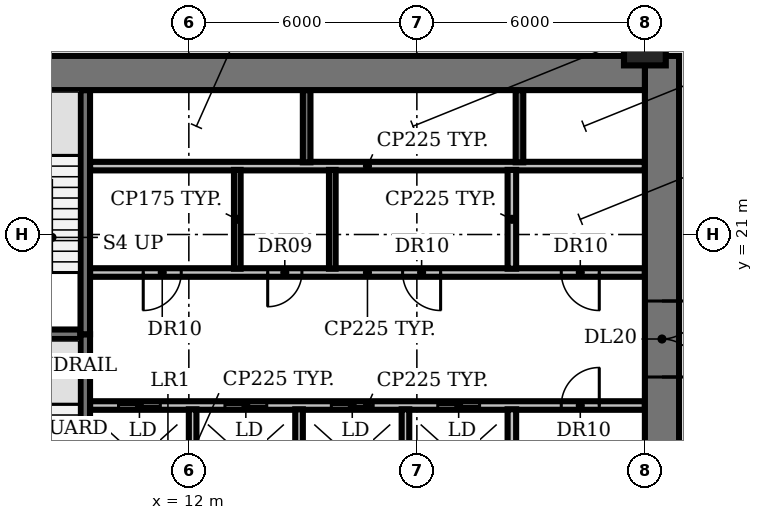
"""IFC4 building model, lengths in metres.
Left out: names, types, materials, properties, quantities, classifications, styles, units other than length and angle.
Written with IfcOpenShell. Run it as: python <this file> out.ifc"""

import sys

from ifc_helpers import new_model, si_unit, direction, frame, frame_2d, origin, origin_2d, place, context, subcontext, project, spatial, rectangle, circle, extrude, element, fill, save


model = new_model("IFC4")
c1 = context("Model", 3, precision=1e-05, world=origin(), true_north=direction((0.0, 1.0)))
c2 = subcontext(c1, "Body", "Model", "MODEL_VIEW")
j1 = project(units=[si_unit("LENGTHUNIT", "METRE"), si_unit("PLANEANGLEUNIT", "RADIAN")], contexts=[c1])
p1 = place(None, origin())
s1 = spatial("IfcSite", under=j1, at=p1, CompositionType="ELEMENT")
p2 = place(p1, origin())
s2 = spatial("IfcBuilding", under=s1, at=p2, CompositionType="ELEMENT")
p3 = place(p2, frame((0.0, 0.0, 11.0)))
s3 = spatial("IfcBuildingStorey", under=s2, at=p3, CompositionType="ELEMENT", Elevation=11.0)
p4 = place(p3, frame((24.0, 26.0, 0.0), z_axis=(0.0, 0.0, 1.0), x_axis=(1.0, 0.0, 0.0)))
e1 = element("IfcColumn", 1, at=p4, inside=s3, PredefinedType="COLUMN", context=c2, shape_type="SweptSolid", body=[
    extrude(circle(Radius=0.55, at=origin_2d()), origin(), (0.0, 0.0, 1.0), 4.15),
])
p5 = place(p3, frame((9.4, 16.5, 0.0), z_axis=(0.0, 0.0, 1.0), x_axis=(1.0, 0.0, 0.0)))
e2 = element("IfcWall", 2, at=p5, inside=s3, PredefinedType="PARTITIONING", context=c2, shape_type="SweptSolid", body=[
    extrude(rectangle(XDim=14.6, YDim=0.225, at=frame_2d((7.3, 0.0))), origin(), (0.0, 0.0, 1.0), 4.15),
])
p6 = place(p5, frame((0.75, 0.0, 0.0)))
e3 = element("IfcOpeningElement", 3, at=p6, cuts=e2, PredefinedType="OPENING", context=c2, shape_type="SweptSolid", body=[
    extrude(rectangle(XDim=1.1, YDim=2.1, at=frame_2d((0.55, 1.05))), frame((0.0, 0.123, 0.0), z_axis=(0.0, -1.0, 0.0), x_axis=(1.0, 0.0, 0.0)), (0.0, 0.0, 1.0), 0.245),
])
p7 = place(p5, frame((3.55, 0.0, 0.0)))
e4 = element("IfcOpeningElement", 4, at=p7, cuts=e2, PredefinedType="OPENING", context=c2, shape_type="SweptSolid", body=[
    extrude(rectangle(XDim=1.1, YDim=2.1, at=frame_2d((0.55, 1.05))), frame((0.0, 0.123, 0.0), z_axis=(0.0, -1.0, 0.0), x_axis=(1.0, 0.0, 0.0)), (0.0, 0.0, 1.0), 0.245),
])
p8 = place(p5, frame((6.35, 0.0, 0.0)))
e5 = element("IfcOpeningElement", 5, at=p8, cuts=e2, PredefinedType="OPENING", context=c2, shape_type="SweptSolid", body=[
    extrude(rectangle(XDim=1.1, YDim=2.1, at=frame_2d((0.55, 1.05))), frame((0.0, 0.123, 0.0), z_axis=(0.0, -1.0, 0.0), x_axis=(1.0, 0.0, 0.0)), (0.0, 0.0, 1.0), 0.245),
])
p9 = place(p5, frame((9.15, 0.0, 0.0)))
e6 = element("IfcOpeningElement", 6, at=p9, cuts=e2, PredefinedType="OPENING", context=c2, shape_type="SweptSolid", body=[
    extrude(rectangle(XDim=1.1, YDim=2.1, at=frame_2d((0.55, 1.05))), frame((0.0, 0.123, 0.0), z_axis=(0.0, -1.0, 0.0), x_axis=(1.0, 0.0, 0.0)), (0.0, 0.0, 1.0), 0.245),
])
p10 = place(p5, frame((12.4, 0.0, 0.0)))
e7 = element("IfcOpeningElement", 7, at=p10, cuts=e2, PredefinedType="OPENING", context=c2, shape_type="SweptSolid", body=[
    extrude(rectangle(XDim=1.0, YDim=2.1, at=frame_2d((0.5, 1.05))), frame((0.0, 0.123, 0.0), z_axis=(0.0, -1.0, 0.0), x_axis=(1.0, 0.0, 0.0)), (0.0, 0.0, 1.0), 0.245),
])
p11 = place(p3, frame((6.0, 18.375, 0.0), z_axis=(0.0, 0.0, 1.0), x_axis=(1.0, 0.0, 0.0)))
e8 = element("IfcWall", 8, at=p11, inside=s3, PredefinedType="SHEAR", context=c2, shape_type="SweptSolid", body=[
    extrude(rectangle(XDim=3.15, YDim=0.25, at=frame_2d((1.575, 0.0))), origin(), (0.0, 0.0, 1.0), 4.15),
])
p12 = place(p3, frame((24.0, 20.0, 0.0), z_axis=(0.0, 0.0, 1.0), x_axis=(-1.0, 0.0, 0.0)))
e9 = element("IfcWall", 9, at=p12, inside=s3, PredefinedType="PARTITIONING", context=c2, shape_type="SweptSolid", body=[
    extrude(rectangle(XDim=14.6, YDim=0.225, at=frame_2d((7.3, 0.0))), origin(), (0.0, 0.0, 1.0), 4.15),
])
p13 = place(p12, frame((12.2, 0.0, 0.0)))
e10 = element("IfcOpeningElement", 10, at=p13, cuts=e9, PredefinedType="OPENING", context=c2, shape_type="SweptSolid", body=[
    extrude(rectangle(XDim=1.0, YDim=2.1, at=frame_2d((0.5, 1.05))), frame((0.0, 0.123, 0.0), z_axis=(0.0, -1.0, 0.0), x_axis=(1.0, 0.0, 0.0)), (0.0, 0.0, 1.0), 0.245),
])
p14 = place(p12, frame((9.025, 0.0, 0.0)))
e11 = element("IfcOpeningElement", 11, at=p14, cuts=e9, PredefinedType="OPENING", context=c2, shape_type="SweptSolid", body=[
    extrude(rectangle(XDim=0.9, YDim=2.1, at=frame_2d((0.45, 1.05))), frame((0.0, 0.123, 0.0), z_axis=(0.0, -1.0, 0.0), x_axis=(1.0, 0.0, 0.0)), (0.0, 0.0, 1.0), 0.245),
])
p15 = place(p12, frame((5.375, 0.0, 0.0)))
e12 = element("IfcOpeningElement", 12, at=p15, cuts=e9, PredefinedType="OPENING", context=c2, shape_type="SweptSolid", body=[
    extrude(rectangle(XDim=1.0, YDim=2.1, at=frame_2d((0.5, 1.05))), frame((0.0, 0.123, 0.0), z_axis=(0.0, -1.0, 0.0), x_axis=(1.0, 0.0, 0.0)), (0.0, 0.0, 1.0), 0.245),
])
p16 = place(p12, frame((1.2, 0.0, 0.0)))
e13 = element("IfcOpeningElement", 13, at=p16, cuts=e9, PredefinedType="OPENING", context=c2, shape_type="SweptSolid", body=[
    extrude(rectangle(XDim=1.0, YDim=2.1, at=frame_2d((0.5, 1.05))), frame((0.0, 0.123, 0.0), z_axis=(0.0, -1.0, 0.0), x_axis=(1.0, 0.0, 0.0)), (0.0, 0.0, 1.0), 0.245),
])
p17 = place(p3, frame((9.4, 22.8, 0.0), z_axis=(0.0, 0.0, 1.0), x_axis=(1.0, 0.0, 0.0)))
e14 = element("IfcWall", 14, at=p17, inside=s3, PredefinedType="PARTITIONING", context=c2, shape_type="SweptSolid", body=[
    extrude(rectangle(XDim=14.6, YDim=0.225, at=frame_2d((7.3, 0.0))), origin(), (0.0, 0.0, 1.0), 4.15),
])
p18 = place(p3, frame((9.275, 18.375, 0.0), z_axis=(0.0, 0.0, 1.0), x_axis=(0.0, -1.0, 0.0)))
e15 = element("IfcWall", 15, at=p18, inside=s3, PredefinedType="SHEAR", context=c2, shape_type="SweptSolid", body=[
    extrude(rectangle(XDim=6.55, YDim=0.25, at=frame_2d((3.275, 0.0))), origin(), (0.0, 0.0, 1.0), 4.15),
])
p19 = place(p18, frame((5.075, 0.0, 0.0)))
e16 = element("IfcOpeningElement", 16, at=p19, cuts=e15, PredefinedType="OPENING", context=c2, shape_type="SweptSolid", body=[
    extrude(rectangle(XDim=1.0, YDim=2.1, at=frame_2d((0.5, 1.05))), frame((0.0, 0.135, 0.0), z_axis=(0.0, -1.0, 0.0), x_axis=(1.0, 0.0, 0.0)), (0.0, 0.0, 1.0), 0.27),
])
p20 = place(p3, frame((9.275, 18.375, 0.0), z_axis=(0.0, 0.0, 1.0), x_axis=(0.0, 1.0, 0.0)))
e17 = element("IfcWall", 17, at=p20, inside=s3, PredefinedType="SHEAR", context=c2, shape_type="SweptSolid", body=[
    extrude(rectangle(XDim=6.425, YDim=0.25, at=frame_2d((3.212, 0.0))), origin(), (0.0, 0.0, 1.0), 4.15),
])
p21 = place(p3, frame((12.1, 13.8, 0.0), z_axis=(0.0, 0.0, 1.0), x_axis=(0.0, 1.0, 0.0)))
e18 = element("IfcWall", 18, at=p21, inside=s3, PredefinedType="SOLIDWALL", context=c2, shape_type="SweptSolid", body=[
    extrude(rectangle(XDim=2.6, YDim=0.2, at=frame_2d((1.3, 0.0))), origin(), (0.0, 0.0, 1.0), 4.15),
])
p22 = place(p3, frame((13.275, 20.1, 0.0), z_axis=(0.0, 0.0, 1.0), x_axis=(0.0, 1.0, 0.0)))
e19 = element("IfcWall", 19, at=p22, inside=s3, PredefinedType="PARTITIONING", context=c2, shape_type="SweptSolid", body=[
    extrude(rectangle(XDim=2.6, YDim=0.175, at=frame_2d((1.3, 0.0))), origin(), (0.0, 0.0, 1.0), 4.15),
])
p23 = place(p3, frame((14.9, 13.8, 0.0), z_axis=(0.0, 0.0, 1.0), x_axis=(0.0, 1.0, 0.0)))
e20 = element("IfcWall", 20, at=p23, inside=s3, PredefinedType="SOLIDWALL", context=c2, shape_type="SweptSolid", body=[
    extrude(rectangle(XDim=2.6, YDim=0.2, at=frame_2d((1.3, 0.0))), origin(), (0.0, 0.0, 1.0), 4.15),
])
p24 = place(p3, frame((15.1, 22.9, 0.0), z_axis=(0.0, 0.0, 1.0), x_axis=(0.0, 1.0, 0.0)))
e21 = element("IfcWall", 21, at=p24, inside=s3, PredefinedType="SHEAR", context=c2, shape_type="SweptSolid", body=[
    extrude(rectangle(XDim=1.9, YDim=0.2, at=frame_2d((0.95, 0.0))), origin(), (0.0, 0.0, 1.0), 4.15),
])
p25 = place(p3, frame((15.775, 20.1, 0.0), z_axis=(0.0, 0.0, 1.0), x_axis=(0.0, 1.0, 0.0)))
e22 = element("IfcWall", 22, at=p25, inside=s3, PredefinedType="PARTITIONING", context=c2, shape_type="SweptSolid", body=[
    extrude(rectangle(XDim=2.6, YDim=0.175, at=frame_2d((1.3, 0.0))), origin(), (0.0, 0.0, 1.0), 4.15),
])
p26 = place(p3, frame((17.7, 13.8, 0.0), z_axis=(0.0, 0.0, 1.0), x_axis=(0.0, 1.0, 0.0)))
e23 = element("IfcWall", 23, at=p26, inside=s3, PredefinedType="SOLIDWALL", context=c2, shape_type="SweptSolid", body=[
    extrude(rectangle(XDim=2.6, YDim=0.2, at=frame_2d((1.3, 0.0))), origin(), (0.0, 0.0, 1.0), 4.15),
])
for number, where, z_axis, x_axis in (
    (24, (20.5, 13.8, 0.0), (0.0, 0.0, 1.0), (0.0, 1.0, 0.0)),
    (25, (20.5, 20.1, 0.0), (0.0, 0.0, 1.0), (0.0, 1.0, 0.0)),
):
    element("IfcWall", number, at=place(p3, frame(where, z_axis=z_axis, x_axis=x_axis)), inside=s3, PredefinedType="PARTITIONING", context=c2, shape_type="SweptSolid", body=[
        extrude(rectangle(XDim=2.6, YDim=0.225, at=frame_2d((1.3, 0.0))), origin(), (0.0, 0.0, 1.0), 4.15),
    ])
p27 = place(p3, frame((20.7, 22.9, 0.0), z_axis=(0.0, 0.0, 1.0), x_axis=(0.0, 1.0, 0.0)))
e26 = element("IfcWall", 26, at=p27, inside=s3, PredefinedType="SHEAR", context=c2, shape_type="SweptSolid", body=[
    extrude(rectangle(XDim=1.9, YDim=0.2, at=frame_2d((0.95, 0.0))), origin(), (0.0, 0.0, 1.0), 4.15),
])
p28 = place(p3, frame((24.45, 25.7, 0.0), z_axis=(0.0, 0.0, 1.0), x_axis=(0.0, -1.0, 0.0)))
e27 = element("IfcWall", 27, at=p28, inside=s3, PredefinedType="SHEAR", context=c2, shape_type="SweptSolid", body=[
    extrude(rectangle(XDim=21.2, YDim=0.9, at=frame_2d((10.6, 0.0))), origin(), (0.0, 0.0, 1.0), 4.15),
])
p29 = place(p28, frame((12.45, 0.0, 0.0)))
e28 = element("IfcOpeningElement", 28, at=p29, cuts=e27, PredefinedType="OPENING", context=c2, shape_type="SweptSolid", body=[
    extrude(rectangle(XDim=0.9, YDim=2.1, at=frame_2d((0.45, 1.05))), frame((0.0, 0.46, 0.0), z_axis=(0.0, -1.0, 0.0), x_axis=(1.0, 0.0, 0.0)), (0.0, 0.0, 1.0), 0.92),
])
p30 = place(p28, frame((6.45, 0.0, 0.0)))
e29 = element("IfcOpeningElement", 29, at=p30, cuts=e27, PredefinedType="OPENING", context=c2, shape_type="SweptSolid", body=[
    extrude(rectangle(XDim=2.0, YDim=2.1, at=frame_2d((1.0, 1.05))), frame((0.0, 0.46, 0.0), z_axis=(0.0, -1.0, 0.0), x_axis=(1.0, 0.0, 0.0)), (0.0, 0.0, 1.0), 0.92),
])
p31 = place(p3, frame((6.0, 25.25, 0.0), z_axis=(0.0, 0.0, 1.0), x_axis=(1.0, 0.0, 0.0)))
e30 = element("IfcWall", 30, at=p31, inside=s3, PredefinedType="SHEAR", context=c2, shape_type="SweptSolid", body=[
    extrude(rectangle(XDim=18.0, YDim=0.9, at=frame_2d((9.0, 0.0))), origin(), (0.0, 0.0, 1.0), 4.15),
])
p32 = place(p6, origin())
e31 = element("IfcDoor", 31, at=p32, inside=s3, OperationType="DOUBLE_DOOR_SLIDING", PredefinedType="DOOR", context=c2, shape_type="SweptSolid", body=[
    extrude(rectangle(XDim=1.1, YDim=2.1, at=frame_2d((0.55, 1.05))), frame((0.0, 0.025, 0.0), z_axis=(0.0, -1.0, 0.0), x_axis=(1.0, 0.0, 0.0)), (0.0, 0.0, 1.0), 0.05),
])
fill(e3, e31)
p33 = place(p7, origin())
e32 = element("IfcDoor", 32, at=p33, inside=s3, OperationType="DOUBLE_DOOR_SLIDING", PredefinedType="DOOR", context=c2, shape_type="SweptSolid", body=[
    extrude(rectangle(XDim=1.1, YDim=2.1, at=frame_2d((0.55, 1.05))), frame((0.0, 0.025, 0.0), z_axis=(0.0, -1.0, 0.0), x_axis=(1.0, 0.0, 0.0)), (0.0, 0.0, 1.0), 0.05),
])
fill(e4, e32)
p34 = place(p8, origin())
e33 = element("IfcDoor", 33, at=p34, inside=s3, OperationType="DOUBLE_DOOR_SLIDING", PredefinedType="DOOR", context=c2, shape_type="SweptSolid", body=[
    extrude(rectangle(XDim=1.1, YDim=2.1, at=frame_2d((0.55, 1.05))), frame((0.0, 0.025, 0.0), z_axis=(0.0, -1.0, 0.0), x_axis=(1.0, 0.0, 0.0)), (0.0, 0.0, 1.0), 0.05),
])
fill(e5, e33)
p35 = place(p9, origin())
e34 = element("IfcDoor", 34, at=p35, inside=s3, OperationType="DOUBLE_DOOR_SLIDING", PredefinedType="DOOR", context=c2, shape_type="SweptSolid", body=[
    extrude(rectangle(XDim=1.1, YDim=2.1, at=frame_2d((0.55, 1.05))), frame((0.0, 0.025, 0.0), z_axis=(0.0, -1.0, 0.0), x_axis=(1.0, 0.0, 0.0)), (0.0, 0.0, 1.0), 0.05),
])
fill(e6, e34)
p36 = place(p10, origin())
e35 = element("IfcDoor", 35, at=p36, inside=s3, OperationType="SINGLE_SWING_RIGHT", PredefinedType="DOOR", context=c2, shape_type="SweptSolid", body=[
    extrude(rectangle(XDim=1.0, YDim=2.1, at=frame_2d((0.5, 1.05))), frame((0.0, 0.025, 0.0), z_axis=(0.0, -1.0, 0.0), x_axis=(1.0, 0.0, 0.0)), (0.0, 0.0, 1.0), 0.05),
])
fill(e7, e35)
p37 = place(p13, origin())
e36 = element("IfcDoor", 36, at=p37, inside=s3, OperationType="SINGLE_SWING_RIGHT", PredefinedType="DOOR", context=c2, shape_type="SweptSolid", body=[
    extrude(rectangle(XDim=1.0, YDim=2.1, at=frame_2d((0.5, 1.05))), frame((0.0, 0.025, 0.0), z_axis=(0.0, -1.0, 0.0), x_axis=(1.0, 0.0, 0.0)), (0.0, 0.0, 1.0), 0.05),
])
fill(e10, e36)
p38 = place(p14, origin())
e37 = element("IfcDoor", 37, at=p38, inside=s3, OperationType="SINGLE_SWING_RIGHT", PredefinedType="DOOR", context=c2, shape_type="SweptSolid", body=[
    extrude(rectangle(XDim=0.9, YDim=2.1, at=frame_2d((0.45, 1.05))), frame((0.0, 0.025, 0.0), z_axis=(0.0, -1.0, 0.0), x_axis=(1.0, 0.0, 0.0)), (0.0, 0.0, 1.0), 0.05),
])
fill(e11, e37)
p39 = place(p15, origin())
e38 = element("IfcDoor", 38, at=p39, inside=s3, OperationType="SINGLE_SWING_LEFT", PredefinedType="DOOR", context=c2, shape_type="SweptSolid", body=[
    extrude(rectangle(XDim=1.0, YDim=2.1, at=frame_2d((0.5, 1.05))), frame((0.0, 0.025, 0.0), z_axis=(0.0, -1.0, 0.0), x_axis=(1.0, 0.0, 0.0)), (0.0, 0.0, 1.0), 0.05),
])
fill(e12, e38)
p40 = place(p16, origin())
e39 = element("IfcDoor", 39, at=p40, inside=s3, OperationType="SINGLE_SWING_LEFT", PredefinedType="DOOR", context=c2, shape_type="SweptSolid", body=[
    extrude(rectangle(XDim=1.0, YDim=2.1, at=frame_2d((0.5, 1.05))), frame((0.0, 0.025, 0.0), z_axis=(0.0, -1.0, 0.0), x_axis=(1.0, 0.0, 0.0)), (0.0, 0.0, 1.0), 0.05),
])
fill(e13, e39)
p41 = place(p30, origin())
e40 = element("IfcDoor", 40, at=p41, inside=s3, OperationType="DOUBLE_DOOR_SINGLE_SWING", PredefinedType="DOOR", context=c2, shape_type="SweptSolid", body=[
    extrude(rectangle(XDim=2.0, YDim=2.1, at=frame_2d((1.0, 1.05))), frame((0.0, 0.025, 0.0), z_axis=(0.0, -1.0, 0.0), x_axis=(1.0, 0.0, 0.0)), (0.0, 0.0, 1.0), 0.05),
])
fill(e29, e40)
save(model, sys.argv[1])
